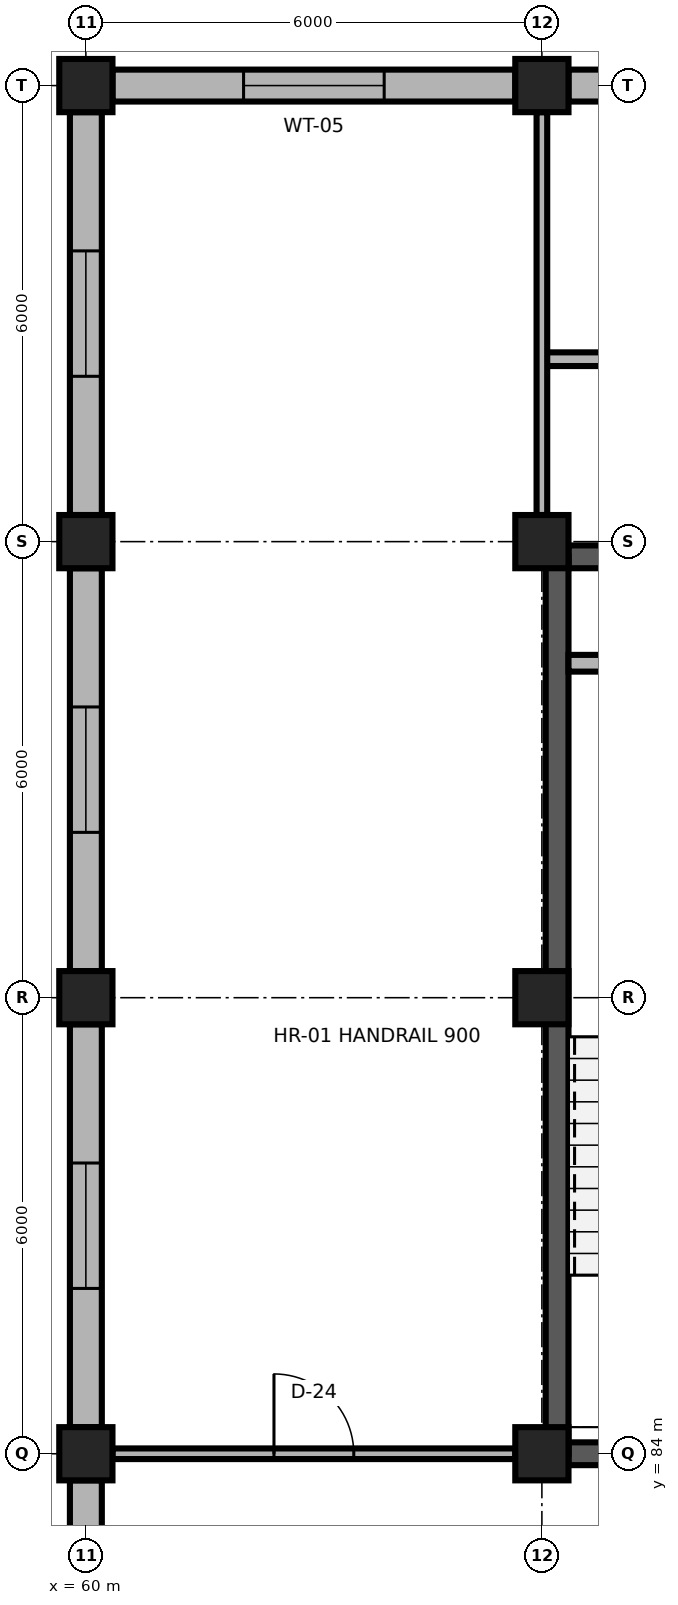
"""IFC4 building model, lengths in metres.
Left out: names, types, materials, properties, quantities, classifications, styles, units other than length and angle.
Written with IfcOpenShell. Run it as: python <this file> out.ifc"""

import sys

from ifc_helpers import new_model, si_unit, direction, frame, frame_2d, origin, origin_2d, place, context, subcontext, project, spatial, rectangle, extrude, element, fill, save


model = new_model("IFC4")
c1 = context("Model", 3, precision=1e-05, world=origin(), true_north=direction((0.0, 1.0)))
c2 = subcontext(c1, "Body", "Model", "MODEL_VIEW")
j1 = project(units=[si_unit("LENGTHUNIT", "METRE"), si_unit("PLANEANGLEUNIT", "RADIAN")], contexts=[c1])
p1 = place(None, origin())
s1 = spatial("IfcSite", under=j1, at=p1, CompositionType="ELEMENT")
p2 = place(p1, origin())
s2 = spatial("IfcBuilding", under=s1, at=p2, CompositionType="ELEMENT")
p3 = place(p2, frame((0.0, 0.0, 40.5)))
s3 = spatial("IfcBuildingStorey", under=s2, at=p3, CompositionType="ELEMENT", Elevation=40.5)
for number, where, z_axis, x_axis in (
    (1, (60.0, 84.0, 0.0), (0.0, 0.0, 1.0), (1.0, 0.0, 0.0)),
    (2, (66.0, 84.0, 0.0), (0.0, 0.0, 1.0), (1.0, 0.0, 0.0)),
    (3, (60.0, 90.0, 0.0), (0.0, 0.0, 1.0), (1.0, 0.0, 0.0)),
    (4, (66.0, 90.0, 0.0), (0.0, 0.0, 1.0), (1.0, 0.0, 0.0)),
    (5, (60.0, 96.0, 0.0), (0.0, 0.0, 1.0), (1.0, 0.0, 0.0)),
    (6, (66.0, 96.0, 0.0), (0.0, 0.0, 1.0), (1.0, 0.0, 0.0)),
    (7, (60.0, 102.0, 0.0), (0.0, 0.0, 1.0), (1.0, 0.0, 0.0)),
    (8, (66.0, 102.0, 0.0), (0.0, 0.0, 1.0), (1.0, 0.0, 0.0)),
):
    element("IfcColumn", number, at=place(p3, frame(where, z_axis=z_axis, x_axis=x_axis)), inside=s3, PredefinedType="COLUMN", context=c2, shape_type="SweptSolid", body=[
        extrude(rectangle(XDim=0.7, YDim=0.7, at=origin_2d()), origin(), (0.0, 0.0, 1.0), 3.9),
    ])
p4 = place(p3, frame((60.35, 102.0, 0.0), z_axis=(0.0, 0.0, 1.0), x_axis=(1.0, 0.0, 0.0)))
e9 = element("IfcWall", 9, at=p4, inside=s3, PredefinedType="SOLIDWALL", context=c2, shape_type="SweptSolid", body=[
    extrude(rectangle(XDim=5.3, YDim=0.42, at=frame_2d((2.65, 0.0))), origin(), (0.0, 0.0, 1.0), 3.32),
])
p5 = place(p4, frame((1.725, 0.0, 0.85)))
e10 = element("IfcOpeningElement", 10, at=p5, cuts=e9, PredefinedType="OPENING", context=c2, shape_type="SweptSolid", body=[
    extrude(rectangle(XDim=1.85, YDim=2.0, at=frame_2d((0.925, 1.0))), frame((0.0, 0.225, 0.0), z_axis=(0.0, -1.0, 0.0), x_axis=(1.0, 0.0, 0.0)), (0.0, 0.0, 1.0), 0.45),
])
p6 = place(p3, frame((66.35, 102.0, 0.0), z_axis=(0.0, 0.0, 1.0), x_axis=(1.0, 0.0, 0.0)))
e11 = element("IfcWall", 11, at=p6, inside=s3, PredefinedType="SOLIDWALL", context=c2, shape_type="SweptSolid", body=[
    extrude(rectangle(XDim=5.3, YDim=0.42, at=frame_2d((2.65, 0.0))), origin(), (0.0, 0.0, 1.0), 3.32),
])
p7 = place(p6, frame((1.725, 0.0, 0.85)))
e12 = element("IfcOpeningElement", 12, at=p7, cuts=e11, PredefinedType="OPENING", context=c2, shape_type="SweptSolid", body=[
    extrude(rectangle(XDim=1.85, YDim=2.0, at=frame_2d((0.925, 1.0))), frame((0.0, 0.225, 0.0), z_axis=(0.0, -1.0, 0.0), x_axis=(1.0, 0.0, 0.0)), (0.0, 0.0, 1.0), 0.45),
])
p8 = place(p3, frame((60.0, 78.35, 0.0), z_axis=(0.0, 0.0, 1.0), x_axis=(0.0, 1.0, 0.0)))
e13 = element("IfcWall", 13, at=p8, inside=s3, PredefinedType="SOLIDWALL", context=c2, shape_type="SweptSolid", body=[
    extrude(rectangle(XDim=5.3, YDim=0.42, at=frame_2d((2.65, 0.0))), origin(), (0.0, 0.0, 1.0), 3.32),
])
p9 = place(p8, frame((1.825, 0.0, 0.85)))
e14 = element("IfcOpeningElement", 14, at=p9, cuts=e13, PredefinedType="OPENING", context=c2, shape_type="SweptSolid", body=[
    extrude(rectangle(XDim=1.65, YDim=1.95, at=frame_2d((0.825, 0.975))), frame((0.0, 0.225, 0.0), z_axis=(0.0, -1.0, 0.0), x_axis=(1.0, 0.0, 0.0)), (0.0, 0.0, 1.0), 0.45),
])
p10 = place(p3, frame((60.0, 84.35, 0.0), z_axis=(0.0, 0.0, 1.0), x_axis=(0.0, 1.0, 0.0)))
e15 = element("IfcWall", 15, at=p10, inside=s3, PredefinedType="SOLIDWALL", context=c2, shape_type="SweptSolid", body=[
    extrude(rectangle(XDim=5.3, YDim=0.42, at=frame_2d((2.65, 0.0))), origin(), (0.0, 0.0, 1.0), 3.32),
])
p11 = place(p10, frame((1.825, 0.0, 0.85)))
e16 = element("IfcOpeningElement", 16, at=p11, cuts=e15, PredefinedType="OPENING", context=c2, shape_type="SweptSolid", body=[
    extrude(rectangle(XDim=1.65, YDim=1.95, at=frame_2d((0.825, 0.975))), frame((0.0, 0.225, 0.0), z_axis=(0.0, -1.0, 0.0), x_axis=(1.0, 0.0, 0.0)), (0.0, 0.0, 1.0), 0.45),
])
p12 = place(p3, frame((60.0, 90.35, 0.0), z_axis=(0.0, 0.0, 1.0), x_axis=(0.0, 1.0, 0.0)))
e17 = element("IfcWall", 17, at=p12, inside=s3, PredefinedType="SOLIDWALL", context=c2, shape_type="SweptSolid", body=[
    extrude(rectangle(XDim=5.3, YDim=0.42, at=frame_2d((2.65, 0.0))), origin(), (0.0, 0.0, 1.0), 3.32),
])
p13 = place(p12, frame((1.825, 0.0, 0.85)))
e18 = element("IfcOpeningElement", 18, at=p13, cuts=e17, PredefinedType="OPENING", context=c2, shape_type="SweptSolid", body=[
    extrude(rectangle(XDim=1.65, YDim=1.95, at=frame_2d((0.825, 0.975))), frame((0.0, 0.225, 0.0), z_axis=(0.0, -1.0, 0.0), x_axis=(1.0, 0.0, 0.0)), (0.0, 0.0, 1.0), 0.45),
])
p14 = place(p3, frame((60.0, 96.35, 0.0), z_axis=(0.0, 0.0, 1.0), x_axis=(0.0, 1.0, 0.0)))
e19 = element("IfcWall", 19, at=p14, inside=s3, PredefinedType="SOLIDWALL", context=c2, shape_type="SweptSolid", body=[
    extrude(rectangle(XDim=5.3, YDim=0.42, at=frame_2d((2.65, 0.0))), origin(), (0.0, 0.0, 1.0), 3.32),
])
p15 = place(p14, frame((1.825, 0.0, 0.85)))
e20 = element("IfcOpeningElement", 20, at=p15, cuts=e19, PredefinedType="OPENING", context=c2, shape_type="SweptSolid", body=[
    extrude(rectangle(XDim=1.65, YDim=1.95, at=frame_2d((0.825, 0.975))), frame((0.0, 0.225, 0.0), z_axis=(0.0, -1.0, 0.0), x_axis=(1.0, 0.0, 0.0)), (0.0, 0.0, 1.0), 0.45),
])
p16 = place(p3, frame((66.35, 84.0, 0.0), z_axis=(0.0, 0.0, 1.0), x_axis=(1.0, 0.0, 0.0)))
e21 = element("IfcWall", 21, at=p16, inside=s3, PredefinedType="SHEAR", context=c2, shape_type="SweptSolid", body=[
    extrude(rectangle(XDim=5.3, YDim=0.3, at=frame_2d((2.65, 0.0))), origin(), (0.0, 0.0, 1.0), 3.66),
])
p17 = place(p16, frame((1.975, 0.0, 0.0)))
e22 = element("IfcOpeningElement", 22, at=p17, cuts=e21, PredefinedType="OPENING", context=c2, shape_type="SweptSolid", body=[
    extrude(rectangle(XDim=1.35, YDim=2.2, at=frame_2d((0.675, 1.1))), frame((0.0, 0.165, 0.0), z_axis=(0.0, -1.0, 0.0), x_axis=(1.0, 0.0, 0.0)), (0.0, 0.0, 1.0), 0.33),
])
p18 = place(p3, frame((66.35, 95.8, 0.0), z_axis=(0.0, 0.0, 1.0), x_axis=(1.0, 0.0, 0.0)))
e23 = element("IfcWall", 23, at=p18, inside=s3, PredefinedType="SHEAR", context=c2, shape_type="SweptSolid", body=[
    extrude(rectangle(XDim=5.3, YDim=0.3, at=frame_2d((2.65, 0.0))), origin(), (0.0, 0.0, 1.0), 3.74),
])
p19 = place(p3, frame((66.2, 84.0, 0.0), z_axis=(0.0, 0.0, 1.0), x_axis=(0.0, 1.0, 0.0)))
e24 = element("IfcWall", 24, at=p19, inside=s3, PredefinedType="SHEAR", context=c2, shape_type="SweptSolid", body=[
    extrude(rectangle(XDim=11.8, YDim=0.3, at=frame_2d((5.9, 0.0))), origin(), (0.0, 0.0, 1.0), 3.74),
])
p20 = place(p3, frame((66.35, 94.4, 0.0), z_axis=(0.0, 0.0, 1.0), x_axis=(1.0, 0.0, 0.0)))
e25 = element("IfcWall", 25, at=p20, inside=s3, PredefinedType="PARTITIONING", context=c2, shape_type="SweptSolid", body=[
    extrude(rectangle(XDim=1.1, YDim=0.22, at=frame_2d((0.55, 0.0))), origin(), (0.0, 0.0, 1.0), 3.74),
])
p21 = place(p3, frame((60.35, 84.0, 0.0), z_axis=(0.0, 0.0, 1.0), x_axis=(1.0, 0.0, 0.0)))
e26 = element("IfcWall", 26, at=p21, inside=s3, PredefinedType="PARTITIONING", context=c2, shape_type="SweptSolid", body=[
    extrude(rectangle(XDim=5.3, YDim=0.14, at=frame_2d((2.65, 0.0))), origin(), (0.0, 0.0, 1.0), 3.348),
])
p22 = place(p21, frame((2.125, 0.0, 0.0)))
e27 = element("IfcOpeningElement", 27, at=p22, cuts=e26, PredefinedType="OPENING", context=c2, shape_type="SweptSolid", body=[
    extrude(rectangle(XDim=1.05, YDim=2.25, at=frame_2d((0.525, 1.125))), frame((0.0, 0.085, 0.0), z_axis=(0.0, -1.0, 0.0), x_axis=(1.0, 0.0, 0.0)), (0.0, 0.0, 1.0), 0.17),
])
p23 = place(p3, frame((66.0, 98.4, 0.0), z_axis=(0.0, 0.0, 1.0), x_axis=(1.0, 0.0, 0.0)))
e28 = element("IfcWall", 28, at=p23, inside=s3, PredefinedType="PARTITIONING", context=c2, shape_type="SweptSolid", body=[
    extrude(rectangle(XDim=6.0, YDim=0.18, at=frame_2d((3.0, 0.0))), origin(), (0.0, 0.0, 1.0), 3.74),
])
p24 = place(p3, frame((66.0, 96.35, 0.0), z_axis=(0.0, 0.0, 1.0), x_axis=(0.0, 1.0, 0.0)))
e29 = element("IfcWall", 29, at=p24, inside=s3, PredefinedType="PARTITIONING", context=c2, shape_type="SweptSolid", body=[
    extrude(rectangle(XDim=5.3, YDim=0.14, at=frame_2d((2.65, 0.0))), origin(), (0.0, 0.0, 1.0), 3.348),
])
p25 = place(p5, origin())
e30 = element("IfcWindow", 30, at=p25, inside=s3, PartitioningType="SINGLE_PANEL", PredefinedType="WINDOW", context=c2, shape_type="SweptSolid", body=[
    extrude(rectangle(XDim=1.85, YDim=2.0, at=frame_2d((0.925, 1.0))), frame((0.0, 0.03, 0.0), z_axis=(0.0, -1.0, 0.0), x_axis=(1.0, 0.0, 0.0)), (0.0, 0.0, 1.0), 0.06),
])
fill(e10, e30)
p26 = place(p11, origin())
e31 = element("IfcWindow", 31, at=p26, inside=s3, PartitioningType="SINGLE_PANEL", PredefinedType="WINDOW", context=c2, shape_type="SweptSolid", body=[
    extrude(rectangle(XDim=1.65, YDim=1.95, at=frame_2d((0.825, 0.975))), frame((0.0, 0.03, 0.0), z_axis=(0.0, -1.0, 0.0), x_axis=(1.0, 0.0, 0.0)), (0.0, 0.0, 1.0), 0.06),
])
fill(e16, e31)
p27 = place(p13, origin())
e32 = element("IfcWindow", 32, at=p27, inside=s3, PartitioningType="SINGLE_PANEL", PredefinedType="WINDOW", context=c2, shape_type="SweptSolid", body=[
    extrude(rectangle(XDim=1.65, YDim=1.95, at=frame_2d((0.825, 0.975))), frame((0.0, 0.03, 0.0), z_axis=(0.0, -1.0, 0.0), x_axis=(1.0, 0.0, 0.0)), (0.0, 0.0, 1.0), 0.06),
])
fill(e18, e32)
p28 = place(p15, origin())
e33 = element("IfcWindow", 33, at=p28, inside=s3, PartitioningType="SINGLE_PANEL", PredefinedType="WINDOW", context=c2, shape_type="SweptSolid", body=[
    extrude(rectangle(XDim=1.65, YDim=1.95, at=frame_2d((0.825, 0.975))), frame((0.0, 0.03, 0.0), z_axis=(0.0, -1.0, 0.0), x_axis=(1.0, 0.0, 0.0)), (0.0, 0.0, 1.0), 0.06),
])
fill(e20, e33)
p29 = place(p22, origin())
e34 = element("IfcDoor", 34, at=p29, inside=s3, OperationType="SINGLE_SWING_LEFT", PredefinedType="DOOR", context=c2, shape_type="SweptSolid", body=[
    extrude(rectangle(XDim=1.05, YDim=2.25, at=frame_2d((0.525, 1.125))), frame((0.0, 0.025, 0.0), z_axis=(0.0, -1.0, 0.0), x_axis=(1.0, 0.0, 0.0)), (0.0, 0.0, 1.0), 0.05),
])
fill(e27, e34)
save(model, sys.argv[1])
